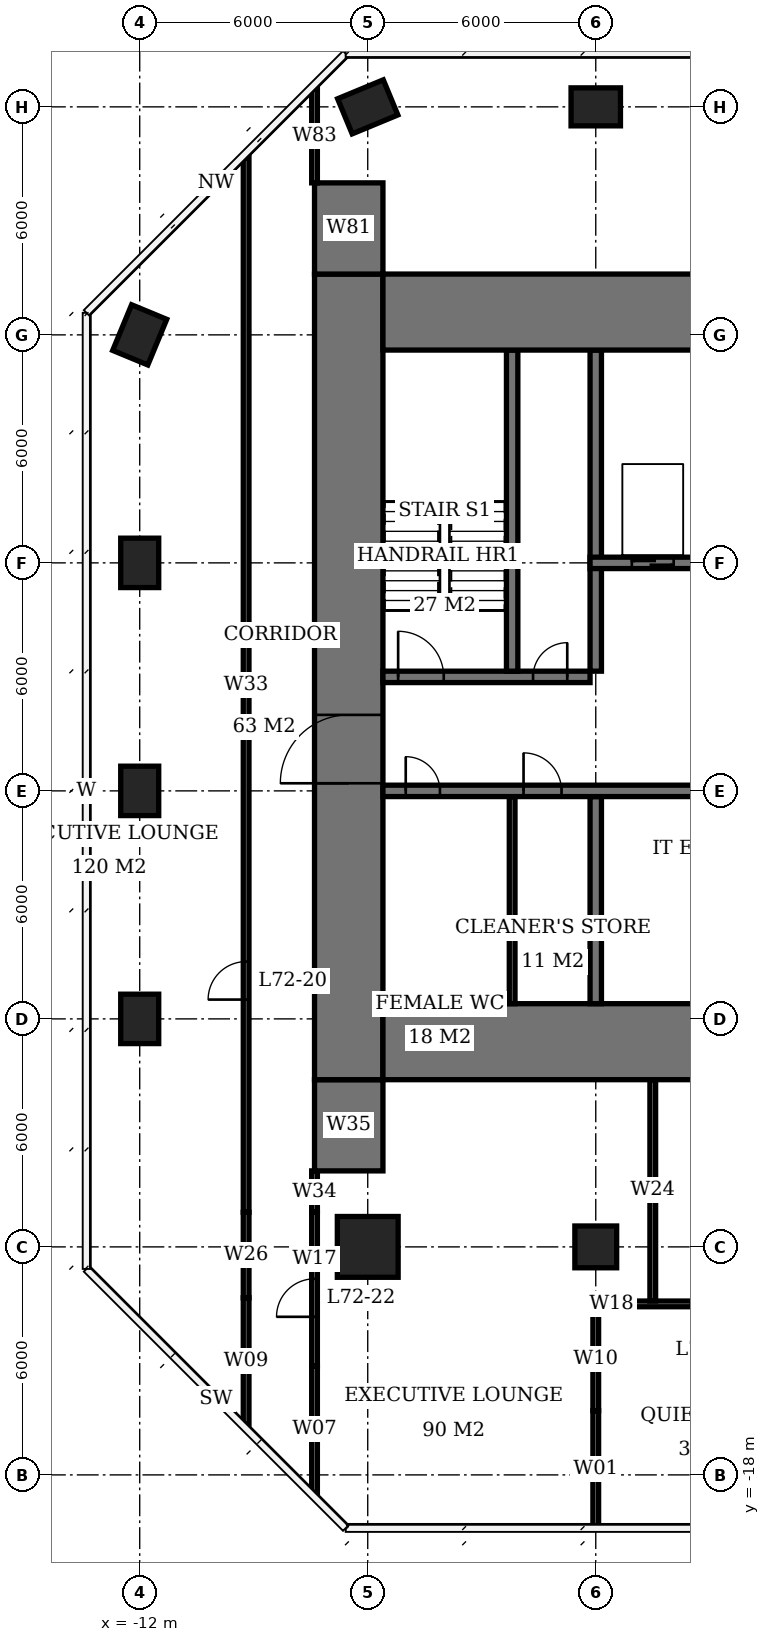
"""IFC4 building model, lengths in metres.
Left out: names, types, materials, properties, quantities, classifications, styles, units other than length and angle.
Written with IfcOpenShell. Run it as: python <this file> out.ifc"""

import sys

from ifc_helpers import new_model, si_unit, direction, frame, frame_2d, origin, origin_2d, place, context, subcontext, project, spatial, rectangle, extrude, element, fill, save


model = new_model("IFC4")
c1 = context("Model", 3, precision=1e-05, world=origin(), true_north=direction((0.0, 1.0)))
c2 = subcontext(c1, "Body", "Model", "MODEL_VIEW")
j1 = project(units=[si_unit("LENGTHUNIT", "METRE"), si_unit("PLANEANGLEUNIT", "RADIAN")], contexts=[c1])
p1 = place(None, origin())
s1 = spatial("IfcSite", under=j1, at=p1, CompositionType="ELEMENT")
p2 = place(p1, origin())
s2 = spatial("IfcBuilding", under=s1, at=p2, CompositionType="ELEMENT")
p3 = place(p2, frame((0.0, 0.0, 291.8)))
s3 = spatial("IfcBuildingStorey", under=s2, at=p3, CompositionType="ELEMENT", Elevation=291.8)
for number, where, z_axis, x_axis in (
    (1, (-12.0, -6.0, 0.0), (0.0, 0.0, 1.0), (0.0, 1.0, 0.0)),
    (2, (-12.0, 0.0, 0.0), (0.0, 0.0, 1.0), (0.0, 1.0, 0.0)),
    (3, (-12.0, 6.0, 0.0), (0.0, 0.0, 1.0), (0.0, 1.0, 0.0)),
    (4, (-12.0, 12.0, 0.0), (0.0, 0.0, 1.0), (0.383, 0.924, 0.0)),
):
    element("IfcColumn", number, at=place(p3, frame(where, z_axis=z_axis, x_axis=x_axis)), inside=s3, PredefinedType="COLUMN", context=c2, shape_type="SweptSolid", body=[
        extrude(rectangle(XDim=1.3, YDim=1.0, at=origin_2d()), origin(), (0.0, 0.0, 1.0), 3.9),
    ])
p4 = place(p3, frame((-6.0, -12.0, 0.0), z_axis=(0.0, 0.0, 1.0), x_axis=(1.0, 0.0, 0.0)))
e5 = element("IfcColumn", 5, at=p4, inside=s3, PredefinedType="COLUMN", context=c2, shape_type="SweptSolid", body=[
    extrude(rectangle(XDim=1.6, YDim=1.6, at=origin_2d()), origin(), (0.0, 0.0, 1.0), 3.9),
])
p5 = place(p3, frame((-6.0, 18.0, 0.0), z_axis=(0.0, 0.0, 1.0), x_axis=(0.923879532511, 0.382683432365, 0.0)))
e6 = element("IfcColumn", 6, at=p5, inside=s3, PredefinedType="COLUMN", context=c2, shape_type="SweptSolid", body=[
    extrude(rectangle(XDim=1.3, YDim=1.0, at=origin_2d()), origin(), (0.0, 0.0, 1.0), 3.9),
])
p6 = place(p3, frame((0.0, -12.0, 0.0), z_axis=(0.0, 0.0, 1.0), x_axis=(1.0, 0.0, 0.0)))
e7 = element("IfcColumn", 7, at=p6, inside=s3, PredefinedType="COLUMN", context=c2, shape_type="SweptSolid", body=[
    extrude(rectangle(XDim=1.1, YDim=1.1, at=origin_2d()), origin(), (0.0, 0.0, 1.0), 3.9),
])
p7 = place(p3, frame((0.0, 18.0, 0.0), z_axis=(0.0, 0.0, 1.0), x_axis=(1.0, 0.0, 0.0)))
e8 = element("IfcColumn", 8, at=p7, inside=s3, PredefinedType="COLUMN", context=c2, shape_type="SweptSolid", body=[
    extrude(rectangle(XDim=1.3, YDim=1.0, at=origin_2d()), origin(), (0.0, 0.0, 1.0), 3.9),
])
for number, where, z_axis, x_axis in (
    (9, (-5.6, -6.6, 0.0), (0.0, 0.0, 1.0), (1.0, 0.0, 0.0)),
    (10, (-5.6, 12.6, 0.0), (0.0, 0.0, 1.0), (1.0, 0.0, 0.0)),
):
    element("IfcWall", number, at=place(p3, frame(where, z_axis=z_axis, x_axis=x_axis)), inside=s3, PredefinedType="SHEAR", context=c2, shape_type="SweptSolid", body=[
        extrude(rectangle(XDim=23.2, YDim=2.0, at=frame_2d((11.6, 0.0))), origin(), (0.0, 0.0, 1.0), 3.9),
    ])
p8 = place(p3, frame((-6.5, -7.6, 0.0), z_axis=(0.0, 0.0, 1.0), x_axis=(0.0, 1.0, 0.0)))
e11 = element("IfcWall", 11, at=p8, inside=s3, PredefinedType="SHEAR", context=c2, shape_type="SweptSolid", body=[
    extrude(rectangle(XDim=21.2, YDim=1.8, at=frame_2d((10.6, 0.0))), origin(), (0.0, 0.0, 1.0), 3.9),
])
p9 = place(p8, frame((7.8, 0.0, 0.0)))
e12 = element("IfcOpeningElement", 12, at=p9, cuts=e11, PredefinedType="OPENING", context=c2, shape_type="SweptSolid", body=[
    extrude(rectangle(XDim=1.8, YDim=2.4, at=frame_2d((0.9, 1.2))), frame((0.0, 0.91, 0.0), z_axis=(0.0, -1.0, 0.0), x_axis=(1.0, 0.0, 0.0)), (0.0, 0.0, 1.0), 1.82),
])
for number, where, z_axis, x_axis in (
    (13, (-6.5, -10.0, 0.0), (0.0, 0.0, 1.0), (0.0, 1.0, 0.0)),
    (14, (-6.5, 13.6, 0.0), (0.0, 0.0, 1.0), (0.0, 1.0, 0.0)),
):
    element("IfcWall", number, at=place(p3, frame(where, z_axis=z_axis, x_axis=x_axis)), inside=s3, PredefinedType="SHEAR", context=c2, shape_type="SweptSolid", body=[
        extrude(rectangle(XDim=2.4, YDim=1.8, at=frame_2d((1.2, 0.0))), origin(), (0.0, 0.0, 1.0), 3.9),
    ])
p10 = place(p3, frame((-5.6, 0.0, 0.0), z_axis=(0.0, 0.0, 1.0), x_axis=(1.0, 0.0, 0.0)))
e15 = element("IfcWall", 15, at=p10, inside=s3, PredefinedType="SHEAR", context=c2, shape_type="SweptSolid", body=[
    extrude(rectangle(XDim=17.75, YDim=0.3, at=frame_2d((8.875, 0.0))), origin(), (0.0, 0.0, 1.0), 3.9),
])
p11 = place(p10, frame((0.6, 0.0, 0.0)))
e16 = element("IfcOpeningElement", 16, at=p11, cuts=e15, PredefinedType="OPENING", context=c2, shape_type="SweptSolid", body=[
    extrude(rectangle(XDim=0.9, YDim=2.1, at=frame_2d((0.45, 1.05))), frame((0.0, 0.16, 0.0), z_axis=(0.0, -1.0, 0.0), x_axis=(1.0, 0.0, 0.0)), (0.0, 0.0, 1.0), 0.32),
])
p12 = place(p10, frame((3.7, 0.0, 0.0)))
e17 = element("IfcOpeningElement", 17, at=p12, cuts=e15, PredefinedType="OPENING", context=c2, shape_type="SweptSolid", body=[
    extrude(rectangle(XDim=1.0, YDim=2.1, at=frame_2d((0.5, 1.05))), frame((0.0, 0.16, 0.0), z_axis=(0.0, -1.0, 0.0), x_axis=(1.0, 0.0, 0.0)), (0.0, 0.0, 1.0), 0.32),
])
p13 = place(p10, frame((9.6, 0.0, 0.0)))
e18 = element("IfcOpeningElement", 18, at=p13, cuts=e15, PredefinedType="OPENING", context=c2, shape_type="SweptSolid", body=[
    extrude(rectangle(XDim=1.0, YDim=2.1, at=frame_2d((0.5, 1.05))), frame((0.0, 0.16, 0.0), z_axis=(0.0, -1.0, 0.0), x_axis=(1.0, 0.0, 0.0)), (0.0, 0.0, 1.0), 0.32),
])
p14 = place(p10, frame((12.55, 0.0, 0.0)))
e19 = element("IfcOpeningElement", 19, at=p14, cuts=e15, PredefinedType="OPENING", context=c2, shape_type="SweptSolid", body=[
    extrude(rectangle(XDim=1.1, YDim=2.1, at=frame_2d((0.55, 1.05))), frame((0.0, 0.16, 0.0), z_axis=(0.0, -1.0, 0.0), x_axis=(1.0, 0.0, 0.0)), (0.0, 0.0, 1.0), 0.32),
])
p15 = place(p10, frame((15.55, 0.0, 0.0)))
e20 = element("IfcOpeningElement", 20, at=p15, cuts=e15, PredefinedType="OPENING", context=c2, shape_type="SweptSolid", body=[
    extrude(rectangle(XDim=1.1, YDim=2.1, at=frame_2d((0.55, 1.05))), frame((0.0, 0.16, 0.0), z_axis=(0.0, -1.0, 0.0), x_axis=(1.0, 0.0, 0.0)), (0.0, 0.0, 1.0), 0.32),
])
p16 = place(p3, frame((-5.6, 3.0, 0.0), z_axis=(0.0, 0.0, 1.0), x_axis=(1.0, 0.0, 0.0)))
e21 = element("IfcWall", 21, at=p16, inside=s3, PredefinedType="SHEAR", context=c2, shape_type="SweptSolid", body=[
    extrude(rectangle(XDim=5.45, YDim=0.3, at=frame_2d((2.725, 0.0))), origin(), (0.0, 0.0, 1.0), 3.9),
])
p17 = place(p16, frame((0.4, 0.0, 0.0)))
e22 = element("IfcOpeningElement", 22, at=p17, cuts=e21, PredefinedType="OPENING", context=c2, shape_type="SweptSolid", body=[
    extrude(rectangle(XDim=1.2, YDim=2.1, at=frame_2d((0.6, 1.05))), frame((0.0, 0.16, 0.0), z_axis=(0.0, -1.0, 0.0), x_axis=(1.0, 0.0, 0.0)), (0.0, 0.0, 1.0), 0.32),
])
p18 = place(p16, frame((3.95, 0.0, 0.0)))
e23 = element("IfcOpeningElement", 23, at=p18, cuts=e21, PredefinedType="OPENING", context=c2, shape_type="SweptSolid", body=[
    extrude(rectangle(XDim=0.9, YDim=2.1, at=frame_2d((0.45, 1.05))), frame((0.0, 0.16, 0.0), z_axis=(0.0, -1.0, 0.0), x_axis=(1.0, 0.0, 0.0)), (0.0, 0.0, 1.0), 0.32),
])
p19 = place(p3, frame((-0.15, 6.0, 0.0), z_axis=(0.0, 0.0, 1.0), x_axis=(1.0, 0.0, 0.0)))
e24 = element("IfcWall", 24, at=p19, inside=s3, PredefinedType="SHEAR", context=c2, shape_type="SweptSolid", body=[
    extrude(rectangle(XDim=17.75, YDim=0.3, at=frame_2d((8.875, 0.0))), origin(), (0.0, 0.0, 1.0), 3.9),
])
p20 = place(p19, frame((13.15, 0.0, 0.0)))
e25 = element("IfcOpeningElement", 25, at=p20, cuts=e24, PredefinedType="OPENING", context=c2, shape_type="SweptSolid", body=[
    extrude(rectangle(XDim=0.9, YDim=2.1, at=frame_2d((0.45, 1.05))), frame((0.0, 0.16, 0.0), z_axis=(0.0, -1.0, 0.0), x_axis=(1.0, 0.0, 0.0)), (0.0, 0.0, 1.0), 0.32),
])
p21 = place(p19, frame((16.25, 0.0, 0.0)))
e26 = element("IfcOpeningElement", 26, at=p21, cuts=e24, PredefinedType="OPENING", context=c2, shape_type="SweptSolid", body=[
    extrude(rectangle(XDim=1.0, YDim=2.1, at=frame_2d((0.5, 1.05))), frame((0.0, 0.16, 0.0), z_axis=(0.0, -1.0, 0.0), x_axis=(1.0, 0.0, 0.0)), (0.0, 0.0, 1.0), 0.32),
])
p22 = place(p19, frame((1.1, 0.0, 0.0)))
e27 = element("IfcOpeningElement", 27, at=p22, cuts=e24, PredefinedType="OPENING", context=c2, shape_type="SweptSolid", body=[
    extrude(rectangle(XDim=1.1, YDim=2.1, at=frame_2d((0.55, 1.05))), frame((0.0, 0.16, 0.0), z_axis=(0.0, -1.0, 0.0), x_axis=(1.0, 0.0, 0.0)), (0.0, 0.0, 1.0), 0.32),
])
p23 = place(p19, frame((4.1, 0.0, 0.0)))
e28 = element("IfcOpeningElement", 28, at=p23, cuts=e24, PredefinedType="OPENING", context=c2, shape_type="SweptSolid", body=[
    extrude(rectangle(XDim=1.1, YDim=2.1, at=frame_2d((0.55, 1.05))), frame((0.0, 0.16, 0.0), z_axis=(0.0, -1.0, 0.0), x_axis=(1.0, 0.0, 0.0)), (0.0, 0.0, 1.0), 0.32),
])
p24 = place(p3, frame((0.0, -5.6, 0.0), z_axis=(0.0, 0.0, 1.0), x_axis=(0.0, 1.0, 0.0)))
e29 = element("IfcWall", 29, at=p24, inside=s3, PredefinedType="SHEAR", context=c2, shape_type="SweptSolid", body=[
    extrude(rectangle(XDim=5.45, YDim=0.3, at=frame_2d((2.725, 0.0))), origin(), (0.0, 0.0, 1.0), 3.9),
])
for number, where, z_axis, x_axis in (
    (30, (0.0, 3.15, 0.0), (0.0, 0.0, 1.0), (0.0, 1.0, 0.0)),
    (31, (-2.2, 3.15, 0.0), (0.0, 0.0, 1.0), (0.0, 1.0, 0.0)),
):
    element("IfcWall", number, at=place(p3, frame(where, z_axis=z_axis, x_axis=x_axis)), inside=s3, PredefinedType="SHEAR", context=c2, shape_type="SweptSolid", body=[
        extrude(rectangle(XDim=8.45, YDim=0.3, at=frame_2d((4.225, 0.0))), origin(), (0.0, 0.0, 1.0), 3.9),
    ])
p25 = place(p3, frame((-2.2, -5.6, 0.0), z_axis=(0.0, 0.0, 1.0), x_axis=(0.0, 1.0, 0.0)))
e32 = element("IfcWall", 32, at=p25, inside=s3, PredefinedType="PLUMBINGWALL", context=c2, shape_type="SweptSolid", body=[
    extrude(rectangle(XDim=5.45, YDim=0.15, at=frame_2d((2.725, 0.0))), origin(), (0.0, 0.0, 1.0), 3.65),
])
p26 = place(p3, frame((-0.075, -13.5, 0.0), z_axis=(0.0, 0.0, 1.0), x_axis=(1.0, 0.0, 0.0)))
e33 = element("IfcWall", 33, at=p26, inside=s3, PredefinedType="PARTITIONING", context=c2, shape_type="SweptSolid", body=[
    extrude(rectangle(XDim=0.985, YDim=0.15, at=frame_2d((0.492, 0.0))), origin(), (0.0, 0.0, 1.0), 2.65),
])
p27 = place(p3, frame((0.91, -13.5, 0.0), z_axis=(0.0, 0.0, 1.0), x_axis=(1.0, 0.0, 0.0)))
e34 = element("IfcWall", 34, at=p27, inside=s3, PredefinedType="PARTITIONING", context=c2, shape_type="SweptSolid", body=[
    extrude(rectangle(XDim=4.18, YDim=0.15, at=frame_2d((2.09, 0.0))), origin(), (0.0, 0.0, 1.0), 3.65),
])
p28 = place(p27, frame((1.59, 0.0, 0.0)))
e35 = element("IfcOpeningElement", 35, at=p28, cuts=e34, PredefinedType="OPENING", context=c2, shape_type="SweptSolid", body=[
    extrude(rectangle(XDim=1.0, YDim=2.4, at=frame_2d((0.5, 1.2))), frame((0.0, 0.085, 0.0), z_axis=(0.0, -1.0, 0.0), x_axis=(1.0, 0.0, 0.0)), (0.0, 0.0, 1.0), 0.17),
])
p29 = place(p3, frame((0.0, -19.375, 0.0), z_axis=(0.0, 0.0, 1.0), x_axis=(0.0, 1.0, 0.0)))
e36 = element("IfcWall", 36, at=p29, inside=s3, PredefinedType="PARTITIONING", context=c2, shape_type="SweptSolid", body=[
    extrude(rectangle(XDim=3.065, YDim=0.15, at=frame_2d((1.532, 0.0))), origin(), (0.0, 0.0, 1.0), 3.65),
])
p30 = place(p3, frame((0.0, -16.31, 0.0), z_axis=(0.0, 0.0, 1.0), x_axis=(0.0, 1.0, 0.0)))
e37 = element("IfcWall", 37, at=p30, inside=s3, PredefinedType="PARTITIONING", context=c2, shape_type="SweptSolid", body=[
    extrude(rectangle(XDim=2.735, YDim=0.15, at=frame_2d((1.368, 0.0))), origin(), (0.0, 0.0, 1.0), 2.65),
])
p31 = place(p3, frame((-9.2, -16.664, 0.0), z_axis=(0.0, 0.0, 1.0), x_axis=(0.0, 1.0, 0.0)))
e38 = element("IfcWall", 38, at=p31, inside=s3, PredefinedType="PARTITIONING", context=c2, shape_type="SweptSolid", body=[
    extrude(rectangle(XDim=3.324, YDim=0.15, at=frame_2d((1.662, 0.0))), origin(), (0.0, 0.0, 1.0), 3.65),
])
p32 = place(p3, frame((-9.2, -13.34, 0.0), z_axis=(0.0, 0.0, 1.0), x_axis=(0.0, 1.0, 0.0)))
e39 = element("IfcWall", 39, at=p32, inside=s3, PredefinedType="PARTITIONING", context=c2, shape_type="SweptSolid", body=[
    extrude(rectangle(XDim=2.25, YDim=0.15, at=frame_2d((1.125, 0.0))), origin(), (0.0, 0.0, 1.0), 2.65),
])
p33 = place(p3, frame((-9.2, -11.09, 0.0), z_axis=(0.0, 0.0, 1.0), x_axis=(0.0, 1.0, 0.0)))
e40 = element("IfcWall", 40, at=p33, inside=s3, PredefinedType="PARTITIONING", context=c2, shape_type="SweptSolid", body=[
    extrude(rectangle(XDim=27.754, YDim=0.15, at=frame_2d((13.877, 0.0))), origin(), (0.0, 0.0, 1.0), 3.65),
])
p34 = place(p33, frame((5.598, 0.0, 0.0)))
e41 = element("IfcOpeningElement", 41, at=p34, cuts=e40, PredefinedType="OPENING", context=c2, shape_type="SweptSolid", body=[
    extrude(rectangle(XDim=1.0, YDim=2.4, at=frame_2d((0.5, 1.2))), frame((0.0, 0.085, 0.0), z_axis=(0.0, -1.0, 0.0), x_axis=(1.0, 0.0, 0.0)), (0.0, 0.0, 1.0), 0.17),
])
p35 = place(p3, frame((-7.4, -18.464, 0.0), z_axis=(0.0, 0.0, 1.0), x_axis=(0.0, 1.0, 0.0)))
e42 = element("IfcWall", 42, at=p35, inside=s3, PredefinedType="PARTITIONING", context=c2, shape_type="SweptSolid", body=[
    extrude(rectangle(XDim=3.324, YDim=0.15, at=frame_2d((1.662, 0.0))), origin(), (0.0, 0.0, 1.0), 3.65),
])
p36 = place(p3, frame((-7.4, -15.14, 0.0), z_axis=(0.0, 0.0, 1.0), x_axis=(0.0, 1.0, 0.0)))
e43 = element("IfcWall", 43, at=p36, inside=s3, PredefinedType="PARTITIONING", context=c2, shape_type="SweptSolid", body=[
    extrude(rectangle(XDim=4.05, YDim=0.15, at=frame_2d((2.025, 0.0))), origin(), (0.0, 0.0, 1.0), 2.65),
])
p37 = place(p36, frame((1.3, 0.0, 0.0)))
e44 = element("IfcOpeningElement", 44, at=p37, cuts=e43, PredefinedType="OPENING", context=c2, shape_type="SweptSolid", body=[
    extrude(rectangle(XDim=1.0, YDim=2.1, at=frame_2d((0.5, 1.05))), frame((0.0, 0.085, 0.0), z_axis=(0.0, -1.0, 0.0), x_axis=(1.0, 0.0, 0.0)), (0.0, 0.0, 1.0), 0.17),
])
p38 = place(p3, frame((-7.4, -11.09, 0.0), z_axis=(0.0, 0.0, 1.0), x_axis=(0.0, 1.0, 0.0)))
e45 = element("IfcWall", 45, at=p38, inside=s3, PredefinedType="PARTITIONING", context=c2, shape_type="SweptSolid", body=[
    extrude(rectangle(XDim=1.09, YDim=0.15, at=frame_2d((0.545, 0.0))), origin(), (0.0, 0.0, 1.0), 3.65),
])
p39 = place(p3, frame((-7.4, 16.0, 0.0), z_axis=(0.0, 0.0, 1.0), x_axis=(0.0, 1.0, 0.0)))
e46 = element("IfcWall", 46, at=p39, inside=s3, PredefinedType="PARTITIONING", context=c2, shape_type="SweptSolid", body=[
    extrude(rectangle(XDim=2.464, YDim=0.15, at=frame_2d((1.232, 0.0))), origin(), (0.0, 0.0, 1.0), 3.65),
])
p40 = place(p3, frame((1.5, -13.425, 0.0), z_axis=(0.0, 0.0, 1.0), x_axis=(0.0, 1.0, 0.0)))
e47 = element("IfcWall", 47, at=p40, inside=s3, PredefinedType="PARTITIONING", context=c2, shape_type="SweptSolid", body=[
    extrude(rectangle(XDim=5.825, YDim=0.15, at=frame_2d((2.913, 0.0))), origin(), (0.0, 0.0, 1.0), 3.65),
])
p41 = place(p9, origin())
e48 = element("IfcDoor", 48, at=p41, inside=s3, OperationType="DOUBLE_DOOR_SINGLE_SWING", PredefinedType="DOOR", context=c2, shape_type="SweptSolid", body=[
    extrude(rectangle(XDim=1.8, YDim=2.4, at=frame_2d((0.9, 1.2))), frame((0.0, 0.025, 0.0), z_axis=(0.0, -1.0, 0.0), x_axis=(1.0, 0.0, 0.0)), (0.0, 0.0, 1.0), 0.05),
])
fill(e12, e48)
p42 = place(p17, origin())
e49 = element("IfcDoor", 49, at=p42, inside=s3, OperationType="SINGLE_SWING_LEFT", PredefinedType="DOOR", context=c2, shape_type="SweptSolid", body=[
    extrude(rectangle(XDim=1.2, YDim=2.1, at=frame_2d((0.6, 1.05))), frame((0.0, 0.025, 0.0), z_axis=(0.0, -1.0, 0.0), x_axis=(1.0, 0.0, 0.0)), (0.0, 0.0, 1.0), 0.05),
])
fill(e22, e49)
p43 = place(p18, origin())
e50 = element("IfcDoor", 50, at=p43, inside=s3, OperationType="SINGLE_SWING_RIGHT", PredefinedType="DOOR", context=c2, shape_type="SweptSolid", body=[
    extrude(rectangle(XDim=0.9, YDim=2.1, at=frame_2d((0.45, 1.05))), frame((0.0, 0.025, 0.0), z_axis=(0.0, -1.0, 0.0), x_axis=(1.0, 0.0, 0.0)), (0.0, 0.0, 1.0), 0.05),
])
fill(e23, e50)
p44 = place(p11, origin())
e51 = element("IfcDoor", 51, at=p44, inside=s3, OperationType="SINGLE_SWING_LEFT", PredefinedType="DOOR", context=c2, shape_type="SweptSolid", body=[
    extrude(rectangle(XDim=0.9, YDim=2.1, at=frame_2d((0.45, 1.05))), frame((0.0, 0.025, 0.0), z_axis=(0.0, -1.0, 0.0), x_axis=(1.0, 0.0, 0.0)), (0.0, 0.0, 1.0), 0.05),
])
fill(e16, e51)
p45 = place(p12, origin())
e52 = element("IfcDoor", 52, at=p45, inside=s3, OperationType="SINGLE_SWING_LEFT", PredefinedType="DOOR", context=c2, shape_type="SweptSolid", body=[
    extrude(rectangle(XDim=1.0, YDim=2.1, at=frame_2d((0.5, 1.05))), frame((0.0, 0.025, 0.0), z_axis=(0.0, -1.0, 0.0), x_axis=(1.0, 0.0, 0.0)), (0.0, 0.0, 1.0), 0.05),
])
fill(e17, e52)
p46 = place(p22, origin())
e53 = element("IfcDoor", 53, at=p46, inside=s3, OperationType="DOUBLE_DOOR_SLIDING", PredefinedType="USERDEFINED", context=c2, shape_type="SweptSolid", body=[
    extrude(rectangle(XDim=1.1, YDim=2.1, at=frame_2d((0.55, 1.05))), frame((0.0, 0.025, 0.0), z_axis=(0.0, -1.0, 0.0), x_axis=(1.0, 0.0, 0.0)), (0.0, 0.0, 1.0), 0.05),
])
fill(e27, e53)
p47 = place(p34, origin())
e54 = element("IfcDoor", 54, at=p47, inside=s3, OperationType="SINGLE_SWING_LEFT", PredefinedType="DOOR", context=c2, shape_type="SweptSolid", body=[
    extrude(rectangle(XDim=1.0, YDim=2.4, at=frame_2d((0.5, 1.2))), frame((0.0, 0.025, 0.0), z_axis=(0.0, -1.0, 0.0), x_axis=(1.0, 0.0, 0.0)), (0.0, 0.0, 1.0), 0.05),
])
fill(e41, e54)
p48 = place(p37, origin())
e55 = element("IfcDoor", 55, at=p48, inside=s3, OperationType="SINGLE_SWING_LEFT", PredefinedType="DOOR", context=c2, shape_type="SweptSolid", body=[
    extrude(rectangle(XDim=1.0, YDim=2.1, at=frame_2d((0.5, 1.05))), frame((0.0, 0.025, 0.0), z_axis=(0.0, -1.0, 0.0), x_axis=(1.0, 0.0, 0.0)), (0.0, 0.0, 1.0), 0.05),
])
fill(e44, e55)
save(model, sys.argv[1])
